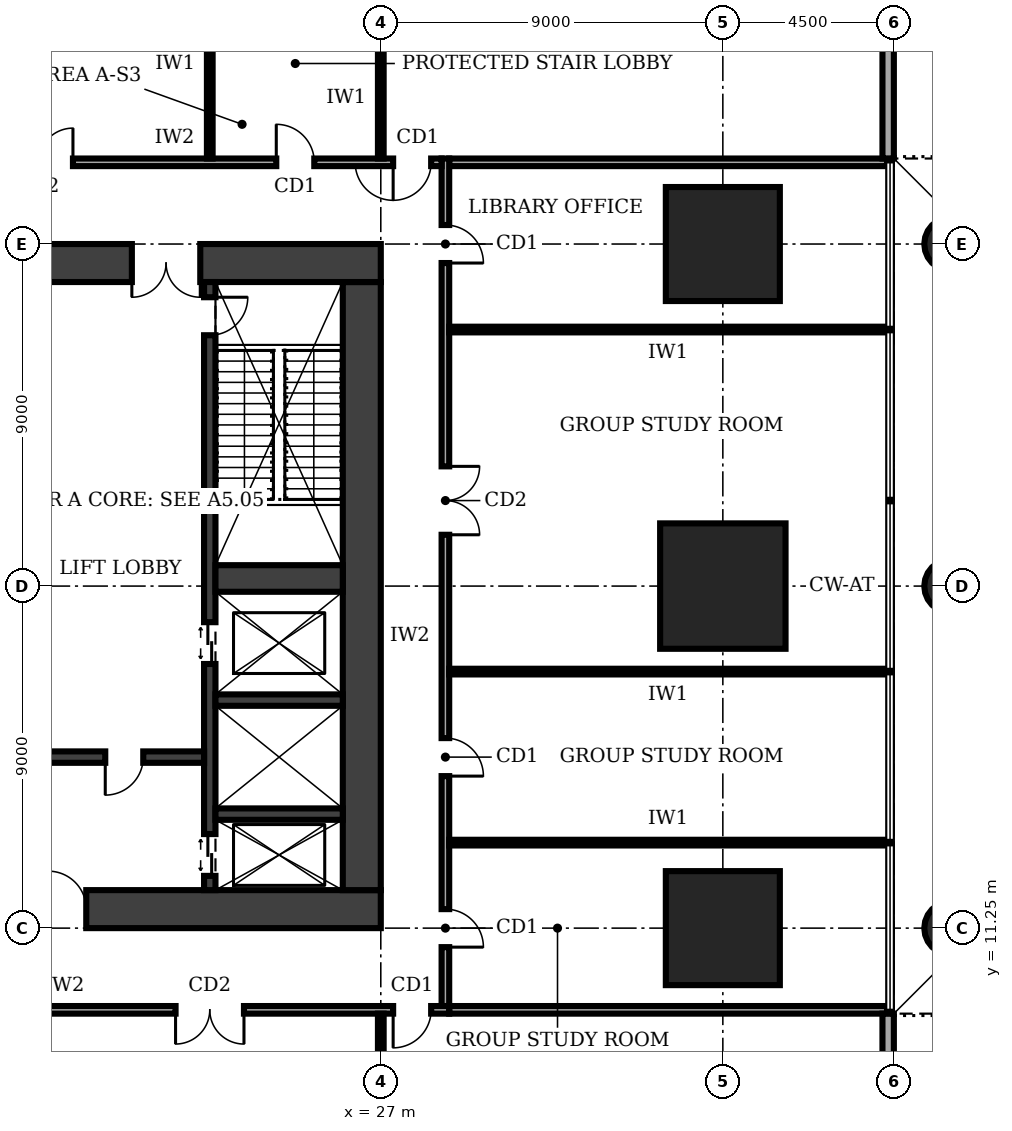
"""IFC4 building model, lengths in metres.
Left out: names, types, materials, properties, quantities, classifications, styles, units other than length and angle.
Written with IfcOpenShell. Run it as: python <this file> out.ifc"""

import sys

from ifc_helpers import new_model, si_unit, direction, frame, frame_2d, origin, origin_2d, place, context, subcontext, project, spatial, rectangle, circle, extrude, element, fill, save


model = new_model("IFC4")
c1 = context("Model", 3, precision=1e-05, world=origin(), true_north=direction((0.0, 1.0)))
c2 = subcontext(c1, "Body", "Model", "MODEL_VIEW")
j1 = project(units=[si_unit("LENGTHUNIT", "METRE"), si_unit("PLANEANGLEUNIT", "RADIAN")], contexts=[c1])
p1 = place(None, origin())
s1 = spatial("IfcSite", under=j1, at=p1, CompositionType="ELEMENT")
p2 = place(p1, origin())
s2 = spatial("IfcBuilding", under=s1, at=p2, CompositionType="ELEMENT")
p3 = place(p2, frame((0.0, 0.0, 11.0)))
s3 = spatial("IfcBuildingStorey", under=s2, at=p3, CompositionType="ELEMENT", Elevation=11.0)
p4 = place(p3, frame((13.5, 11.75, 0.0), z_axis=(0.0, 0.0, 1.0), x_axis=(1.0, 0.0, 0.0)))
e1 = element("IfcWall", 1, at=p4, inside=s3, PredefinedType="SHEAR", context=c2, shape_type="SweptSolid", body=[
    extrude(rectangle(XDim=13.5, YDim=1.0, at=frame_2d((6.75, 0.0))), origin(), (0.0, 0.0, 1.0), 5.0),
])
p5 = place(p4, frame((4.75, 0.0, 0.0)))
e2 = element("IfcOpeningElement", 2, at=p5, cuts=e1, PredefinedType="OPENING", context=c2, shape_type="SweptSolid", body=[
    extrude(rectangle(XDim=1.0, YDim=2.1, at=frame_2d((0.5, 1.05))), frame((0.0, 0.51, 0.0), z_axis=(0.0, -1.0, 0.0), x_axis=(1.0, 0.0, 0.0)), (0.0, 0.0, 1.0), 1.02),
])
p6 = place(p3, frame((26.5, 12.25, 0.0), z_axis=(0.0, 0.0, 1.0), x_axis=(0.0, 1.0, 0.0)))
e3 = element("IfcWall", 3, at=p6, inside=s3, PredefinedType="SHEAR", context=c2, shape_type="SweptSolid", body=[
    extrude(rectangle(XDim=16.0, YDim=1.0, at=frame_2d((8.0, 0.0))), origin(), (0.0, 0.0, 1.0), 5.0),
])
p7 = place(p3, frame((27.0, 28.75, 0.0), z_axis=(0.0, 0.0, 1.0), x_axis=(-1.0, 0.0, 0.0)))
e4 = element("IfcWall", 4, at=p7, inside=s3, PredefinedType="SHEAR", context=c2, shape_type="SweptSolid", body=[
    extrude(rectangle(XDim=13.5, YDim=1.0, at=frame_2d((6.75, 0.0))), origin(), (0.0, 0.0, 1.0), 5.0),
])
p8 = place(p7, frame((4.75, 0.0, 0.0)))
e5 = element("IfcOpeningElement", 5, at=p8, cuts=e4, PredefinedType="OPENING", context=c2, shape_type="SweptSolid", body=[
    extrude(rectangle(XDim=1.8, YDim=2.1, at=frame_2d((0.9, 1.05))), frame((0.0, 0.51, 0.0), z_axis=(0.0, -1.0, 0.0), x_axis=(1.0, 0.0, 0.0)), (0.0, 0.0, 1.0), 1.02),
])
p9 = place(p3, frame((22.5, 12.25, 0.0), z_axis=(0.0, 0.0, 1.0), x_axis=(0.0, 1.0, 0.0)))
e6 = element("IfcWall", 6, at=p9, inside=s3, PredefinedType="SHEAR", context=c2, shape_type="SweptSolid", body=[
    extrude(rectangle(XDim=16.0, YDim=0.3, at=frame_2d((8.0, 0.0))), origin(), (0.0, 0.0, 1.0), 5.0),
])
p10 = place(p9, frame((14.6, 0.0, 0.0)))
e7 = element("IfcOpeningElement", 7, at=p10, cuts=e6, PredefinedType="OPENING", context=c2, shape_type="SweptSolid", body=[
    extrude(rectangle(XDim=1.0, YDim=2.1, at=frame_2d((0.5, 1.05))), frame((0.0, 0.16, 0.0), z_axis=(0.0, -1.0, 0.0), x_axis=(1.0, 0.0, 0.0)), (0.0, 0.0, 1.0), 0.32),
])
p11 = place(p9, frame((0.375, 0.0, 0.0)))
e8 = element("IfcOpeningElement", 8, at=p11, cuts=e6, PredefinedType="OPENING", context=c2, shape_type="SweptSolid", body=[
    extrude(rectangle(XDim=1.1, YDim=2.1, at=frame_2d((0.55, 1.05))), frame((0.0, 0.16, 0.0), z_axis=(0.0, -1.0, 0.0), x_axis=(1.0, 0.0, 0.0)), (0.0, 0.0, 1.0), 0.32),
])
p12 = place(p9, frame((5.95, 0.0, 0.0)))
e9 = element("IfcOpeningElement", 9, at=p12, cuts=e6, PredefinedType="OPENING", context=c2, shape_type="SweptSolid", body=[
    extrude(rectangle(XDim=1.1, YDim=2.1, at=frame_2d((0.55, 1.05))), frame((0.0, 0.16, 0.0), z_axis=(0.0, -1.0, 0.0), x_axis=(1.0, 0.0, 0.0)), (0.0, 0.0, 1.0), 0.32),
])
p13 = place(p3, frame((18.15, 15.75, 0.0), z_axis=(0.0, 0.0, 1.0), x_axis=(1.0, 0.0, 0.0)))
e10 = element("IfcWall", 10, at=p13, inside=s3, PredefinedType="SHEAR", context=c2, shape_type="SweptSolid", body=[
    extrude(rectangle(XDim=4.2, YDim=0.3, at=frame_2d((2.1, 0.0))), origin(), (0.0, 0.0, 1.0), 5.0),
])
p14 = place(p13, frame((1.6, 0.0, 0.0)))
e11 = element("IfcOpeningElement", 11, at=p14, cuts=e10, PredefinedType="OPENING", context=c2, shape_type="SweptSolid", body=[
    extrude(rectangle(XDim=1.0, YDim=2.1, at=frame_2d((0.5, 1.05))), frame((0.0, 0.16, 0.0), z_axis=(0.0, -1.0, 0.0), x_axis=(1.0, 0.0, 0.0)), (0.0, 0.0, 1.0), 0.32),
])
for number, where, z_axis, x_axis in (
    (12, (22.65, 14.25, 0.0), (0.0, 0.0, 1.0), (1.0, 0.0, 0.0)),
    (13, (22.65, 17.25, 0.0), (0.0, 0.0, 1.0), (1.0, 0.0, 0.0)),
):
    element("IfcWall", number, at=place(p3, frame(where, z_axis=z_axis, x_axis=x_axis)), inside=s3, PredefinedType="SHEAR", context=c2, shape_type="SweptSolid", body=[
        extrude(rectangle(XDim=3.35, YDim=0.3, at=frame_2d((1.675, 0.0))), origin(), (0.0, 0.0, 1.0), 5.0),
    ])
p15 = place(p3, frame((22.65, 20.45, 0.0), z_axis=(0.0, 0.0, 1.0), x_axis=(1.0, 0.0, 0.0)))
e14 = element("IfcWall", 14, at=p15, inside=s3, PredefinedType="SHEAR", context=c2, shape_type="SweptSolid", body=[
    extrude(rectangle(XDim=3.35, YDim=0.7, at=frame_2d((1.675, 0.0))), origin(), (0.0, 0.0, 1.0), 5.0),
])
p16 = place(p3, frame((36.0, 11.25, 0.0), z_axis=(0.0, 0.0, 1.0), x_axis=(1.0, 0.0, 0.0)))
e15 = element("IfcColumn", 15, at=p16, inside=s3, PredefinedType="COLUMN", context=c2, shape_type="SweptSolid", body=[
    extrude(rectangle(XDim=3.0, YDim=3.0, at=origin_2d()), origin(), (0.0, 0.0, 1.0), 5.0),
])
p17 = place(p3, frame((36.0, 20.25, 0.0), z_axis=(0.0, 0.0, 1.0), x_axis=(1.0, 0.0, 0.0)))
e16 = element("IfcColumn", 16, at=p17, inside=s3, PredefinedType="COLUMN", context=c2, shape_type="SweptSolid", body=[
    extrude(rectangle(XDim=3.3, YDim=3.3, at=origin_2d()), origin(), (0.0, 0.0, 1.0), 5.0),
])
p18 = place(p3, frame((36.0, 29.25, 0.0), z_axis=(0.0, 0.0, 1.0), x_axis=(1.0, 0.0, 0.0)))
e17 = element("IfcColumn", 17, at=p18, inside=s3, PredefinedType="COLUMN", context=c2, shape_type="SweptSolid", body=[
    extrude(rectangle(XDim=3.0, YDim=3.0, at=origin_2d()), origin(), (0.0, 0.0, 1.0), 5.0),
])
for number, where, z_axis, x_axis in (
    (18, (42.0, 11.25, 0.0), (0.0, 0.0, 1.0), (1.0, 0.0, 0.0)),
    (19, (42.0, 20.25, 0.0), (0.0, 0.0, 1.0), (1.0, 0.0, 0.0)),
    (20, (42.0, 29.25, 0.0), (0.0, 0.0, 1.0), (1.0, 0.0, 0.0)),
):
    element("IfcColumn", number, at=place(p3, frame(where, z_axis=z_axis, x_axis=x_axis)), inside=s3, PredefinedType="COLUMN", context=c2, shape_type="SweptSolid", body=[
        extrude(circle(Radius=0.7, at=origin_2d()), origin(), (0.0, 0.0, 1.0), 5.0),
    ])
p19 = place(p3, frame((11.9, 9.1, 0.0), z_axis=(0.0, 0.0, 1.0), x_axis=(1.0, 0.0, 0.0)))
e21 = element("IfcWall", 21, at=p19, inside=s3, PredefinedType="SOLIDWALL", context=c2, shape_type="SweptSolid", body=[
    extrude(rectangle(XDim=16.9, YDim=0.2, at=frame_2d((8.45, 0.0))), origin(), (0.0, 0.0, 1.0), 4.7),
])
p20 = place(p19, frame((2.05, 0.0, 0.0)))
e22 = element("IfcOpeningElement", 22, at=p20, cuts=e21, PredefinedType="OPENING", context=c2, shape_type="SweptSolid", body=[
    extrude(rectangle(XDim=1.8, YDim=2.1, at=frame_2d((0.9, 1.05))), frame((0.0, 0.11, 0.0), z_axis=(0.0, -1.0, 0.0), x_axis=(1.0, 0.0, 0.0)), (0.0, 0.0, 1.0), 0.22),
])
p21 = place(p19, frame((9.7, 0.0, 0.0)))
e23 = element("IfcOpeningElement", 23, at=p21, cuts=e21, PredefinedType="OPENING", context=c2, shape_type="SweptSolid", body=[
    extrude(rectangle(XDim=1.8, YDim=2.1, at=frame_2d((0.9, 1.05))), frame((0.0, 0.11, 0.0), z_axis=(0.0, -1.0, 0.0), x_axis=(1.0, 0.0, 0.0)), (0.0, 0.0, 1.0), 0.22),
])
p22 = place(p19, frame((15.425, 0.0, 0.0)))
e24 = element("IfcOpeningElement", 24, at=p22, cuts=e21, PredefinedType="OPENING", context=c2, shape_type="SweptSolid", body=[
    extrude(rectangle(XDim=1.0, YDim=2.1, at=frame_2d((0.5, 1.05))), frame((0.0, 0.11, 0.0), z_axis=(0.0, -1.0, 0.0), x_axis=(1.0, 0.0, 0.0)), (0.0, 0.0, 1.0), 0.22),
])
p23 = place(p3, frame((28.7, 9.2, 0.0), z_axis=(0.0, 0.0, 1.0), x_axis=(0.0, 1.0, 0.0)))
e25 = element("IfcWall", 25, at=p23, inside=s3, PredefinedType="SOLIDWALL", context=c2, shape_type="SweptSolid", body=[
    extrude(rectangle(XDim=22.3, YDim=0.2, at=frame_2d((11.15, 0.0))), origin(), (0.0, 0.0, 1.0), 4.7),
])
p24 = place(p23, frame((1.55, 0.0, 0.0)))
e26 = element("IfcOpeningElement", 26, at=p24, cuts=e25, PredefinedType="OPENING", context=c2, shape_type="SweptSolid", body=[
    extrude(rectangle(XDim=1.0, YDim=2.1, at=frame_2d((0.5, 1.05))), frame((0.0, 0.11, 0.0), z_axis=(0.0, -1.0, 0.0), x_axis=(1.0, 0.0, 0.0)), (0.0, 0.0, 1.0), 0.22),
])
p25 = place(p23, frame((6.05, 0.0, 0.0)))
e27 = element("IfcOpeningElement", 27, at=p25, cuts=e25, PredefinedType="OPENING", context=c2, shape_type="SweptSolid", body=[
    extrude(rectangle(XDim=1.0, YDim=2.1, at=frame_2d((0.5, 1.05))), frame((0.0, 0.11, 0.0), z_axis=(0.0, -1.0, 0.0), x_axis=(1.0, 0.0, 0.0)), (0.0, 0.0, 1.0), 0.22),
])
p26 = place(p23, frame((12.4, 0.0, 0.0)))
e28 = element("IfcOpeningElement", 28, at=p26, cuts=e25, PredefinedType="OPENING", context=c2, shape_type="SweptSolid", body=[
    extrude(rectangle(XDim=1.8, YDim=2.1, at=frame_2d((0.9, 1.05))), frame((0.0, 0.11, 0.0), z_axis=(0.0, -1.0, 0.0), x_axis=(1.0, 0.0, 0.0)), (0.0, 0.0, 1.0), 0.22),
])
p27 = place(p23, frame((19.55, 0.0, 0.0)))
e29 = element("IfcOpeningElement", 29, at=p27, cuts=e25, PredefinedType="OPENING", context=c2, shape_type="SweptSolid", body=[
    extrude(rectangle(XDim=1.0, YDim=2.1, at=frame_2d((0.5, 1.05))), frame((0.0, 0.11, 0.0), z_axis=(0.0, -1.0, 0.0), x_axis=(1.0, 0.0, 0.0)), (0.0, 0.0, 1.0), 0.22),
])
p28 = place(p3, frame((28.6, 31.4, 0.0), z_axis=(0.0, 0.0, 1.0), x_axis=(-1.0, 0.0, 0.0)))
e30 = element("IfcWall", 30, at=p28, inside=s3, PredefinedType="SOLIDWALL", context=c2, shape_type="SweptSolid", body=[
    extrude(rectangle(XDim=16.9, YDim=0.2, at=frame_2d((8.45, 0.0))), origin(), (0.0, 0.0, 1.0), 4.7),
])
p29 = place(p28, frame((15.425, 0.0, 0.0)))
e31 = element("IfcOpeningElement", 31, at=p29, cuts=e30, PredefinedType="OPENING", context=c2, shape_type="SweptSolid", body=[
    extrude(rectangle(XDim=1.0, YDim=2.1, at=frame_2d((0.5, 1.05))), frame((0.0, 0.11, 0.0), z_axis=(0.0, -1.0, 0.0), x_axis=(1.0, 0.0, 0.0)), (0.0, 0.0, 1.0), 0.22),
])
p30 = place(p28, frame((9.7, 0.0, 0.0)))
e32 = element("IfcOpeningElement", 32, at=p30, cuts=e30, PredefinedType="OPENING", context=c2, shape_type="SweptSolid", body=[
    extrude(rectangle(XDim=1.8, YDim=2.1, at=frame_2d((0.9, 1.05))), frame((0.0, 0.11, 0.0), z_axis=(0.0, -1.0, 0.0), x_axis=(1.0, 0.0, 0.0)), (0.0, 0.0, 1.0), 0.22),
])
p31 = place(p28, frame((3.35, 0.0, 0.0)))
e33 = element("IfcOpeningElement", 33, at=p31, cuts=e30, PredefinedType="OPENING", context=c2, shape_type="SweptSolid", body=[
    extrude(rectangle(XDim=1.0, YDim=2.1, at=frame_2d((0.5, 1.05))), frame((0.0, 0.11, 0.0), z_axis=(0.0, -1.0, 0.0), x_axis=(1.0, 0.0, 0.0)), (0.0, 0.0, 1.0), 0.22),
])
p32 = place(p28, frame((0.275, 0.0, 0.0)))
e34 = element("IfcOpeningElement", 34, at=p32, cuts=e30, PredefinedType="OPENING", context=c2, shape_type="SweptSolid", body=[
    extrude(rectangle(XDim=1.0, YDim=2.1, at=frame_2d((0.5, 1.05))), frame((0.0, 0.11, 0.0), z_axis=(0.0, -1.0, 0.0), x_axis=(1.0, 0.0, 0.0)), (0.0, 0.0, 1.0), 0.22),
])
for number, where, z_axis, x_axis in (
    (35, (28.8, 9.1, 0.0), (0.0, 0.0, 1.0), (1.0, 0.0, 0.0)),
    (36, (28.8, 31.4, 0.0), (0.0, 0.0, 1.0), (1.0, 0.0, 0.0)),
):
    element("IfcWall", number, at=place(p3, frame(where, z_axis=z_axis, x_axis=x_axis)), inside=s3, PredefinedType="SOLIDWALL", context=c2, shape_type="SweptSolid", body=[
        extrude(rectangle(XDim=11.52, YDim=0.2, at=frame_2d((5.76, 0.0))), origin(), (0.0, 0.0, 1.0), 4.7),
    ])
p33 = place(p3, frame((27.0, 5.82, 0.0), z_axis=(0.0, 0.0, 1.0), x_axis=(0.0, 1.0, 0.0)))
e37 = element("IfcWall", 37, at=p33, inside=s3, PredefinedType="PARTITIONING", context=c2, shape_type="SweptSolid", body=[
    extrude(rectangle(XDim=3.18, YDim=0.15, at=frame_2d((1.59, 0.0))), origin(), (0.0, 0.0, 1.0), 3.8),
])
p34 = place(p3, frame((22.5, 31.5, 0.0), z_axis=(0.0, 0.0, 1.0), x_axis=(0.0, 1.0, 0.0)))
e38 = element("IfcWall", 38, at=p34, inside=s3, PredefinedType="PARTITIONING", context=c2, shape_type="SweptSolid", body=[
    extrude(rectangle(XDim=4.95, YDim=0.15, at=frame_2d((2.475, 0.0))), origin(), (0.0, 0.0, 1.0), 4.7),
])
p35 = place(p3, frame((27.0, 31.5, 0.0), z_axis=(0.0, 0.0, 1.0), x_axis=(0.0, 1.0, 0.0)))
e39 = element("IfcWall", 39, at=p35, inside=s3, PredefinedType="PARTITIONING", context=c2, shape_type="SweptSolid", body=[
    extrude(rectangle(XDim=3.18, YDim=0.15, at=frame_2d((1.59, 0.0))), origin(), (0.0, 0.0, 1.0), 3.8),
])
for number, where, z_axis, x_axis in (
    (40, (28.8, 13.5, 0.0), (0.0, 0.0, 1.0), (1.0, 0.0, 0.0)),
    (41, (28.8, 18.0, 0.0), (0.0, 0.0, 1.0), (1.0, 0.0, 0.0)),
    (42, (28.8, 27.0, 0.0), (0.0, 0.0, 1.0), (1.0, 0.0, 0.0)),
):
    element("IfcWall", number, at=place(p3, frame(where, z_axis=z_axis, x_axis=x_axis)), inside=s3, PredefinedType="PARTITIONING", context=c2, shape_type="SweptSolid", body=[
        extrude(rectangle(XDim=11.52, YDim=0.15, at=frame_2d((5.76, 0.0))), origin(), (0.0, 0.0, 1.0), 4.7),
    ])
p36 = place(p3, frame((40.35, 4.97, 0.0), z_axis=(0.0, 0.0, 1.0), x_axis=(0.0, 1.0, 0.0)))
e43 = element("IfcWall", 43, at=p36, inside=s3, PredefinedType="SOLIDWALL", context=c2, shape_type="SweptSolid", body=[
    extrude(rectangle(XDim=4.03, YDim=0.3, at=frame_2d((2.015, 0.0))), origin(), (0.0, 0.0, 1.0), 4.7),
])
p37 = place(p3, frame((40.35, 31.5, 0.0), z_axis=(0.0, 0.0, 1.0), x_axis=(0.0, 1.0, 0.0)))
e44 = element("IfcWall", 44, at=p37, inside=s3, PredefinedType="SOLIDWALL", context=c2, shape_type="SweptSolid", body=[
    extrude(rectangle(XDim=16.63, YDim=0.3, at=frame_2d((8.315, 0.0))), origin(), (0.0, 0.0, 1.0), 4.7),
])
p38 = place(p37, frame((12.1, 0.0, 0.0)))
e45 = element("IfcOpeningElement", 45, at=p38, cuts=e44, PredefinedType="OPENING", context=c2, shape_type="SweptSolid", body=[
    extrude(rectangle(XDim=1.8, YDim=2.1, at=frame_2d((0.9, 1.05))), frame((0.0, 0.16, 0.0), z_axis=(0.0, -1.0, 0.0), x_axis=(1.0, 0.0, 0.0)), (0.0, 0.0, 1.0), 0.32),
])
p39 = place(p5, origin())
e46 = element("IfcDoor", 46, at=p39, inside=s3, OperationType="SINGLE_SWING_LEFT", PredefinedType="DOOR", context=c2, shape_type="SweptSolid", body=[
    extrude(rectangle(XDim=1.0, YDim=2.1, at=frame_2d((0.5, 1.05))), frame((0.0, 0.025, 0.0), z_axis=(0.0, -1.0, 0.0), x_axis=(1.0, 0.0, 0.0)), (0.0, 0.0, 1.0), 0.05),
])
fill(e2, e46)
p40 = place(p8, origin())
e47 = element("IfcDoor", 47, at=p40, inside=s3, OperationType="DOUBLE_DOOR_SINGLE_SWING", PredefinedType="DOOR", context=c2, shape_type="SweptSolid", body=[
    extrude(rectangle(XDim=1.8, YDim=2.1, at=frame_2d((0.9, 1.05))), frame((0.0, 0.025, 0.0), z_axis=(0.0, -1.0, 0.0), x_axis=(1.0, 0.0, 0.0)), (0.0, 0.0, 1.0), 0.05),
])
fill(e5, e47)
p41 = place(p14, frame((1.0, 0.0, 0.0), z_axis=(0.0, 0.0, 1.0), x_axis=(-1.0, 0.0, 0.0)))
e48 = element("IfcDoor", 48, at=p41, inside=s3, OperationType="SINGLE_SWING_RIGHT", PredefinedType="DOOR", context=c2, shape_type="SweptSolid", body=[
    extrude(rectangle(XDim=1.0, YDim=2.1, at=frame_2d((0.5, 1.05))), frame((0.0, 0.025, 0.0), z_axis=(0.0, -1.0, 0.0), x_axis=(1.0, 0.0, 0.0)), (0.0, 0.0, 1.0), 0.05),
])
fill(e11, e48)
p42 = place(p10, frame((1.0, 0.0, 0.0), z_axis=(0.0, 0.0, 1.0), x_axis=(-1.0, 0.0, 0.0)))
e49 = element("IfcDoor", 49, at=p42, inside=s3, OperationType="SINGLE_SWING_LEFT", PredefinedType="DOOR", context=c2, shape_type="SweptSolid", body=[
    extrude(rectangle(XDim=1.0, YDim=2.1, at=frame_2d((0.5, 1.05))), frame((0.0, 0.025, 0.0), z_axis=(0.0, -1.0, 0.0), x_axis=(1.0, 0.0, 0.0)), (0.0, 0.0, 1.0), 0.05),
])
fill(e7, e49)
p43 = place(p11, origin())
e50 = element("IfcDoor", 50, at=p43, inside=s3, OperationType="DOUBLE_DOOR_SLIDING", PredefinedType="DOOR", context=c2, shape_type="SweptSolid", body=[
    extrude(rectangle(XDim=1.1, YDim=2.1, at=frame_2d((0.55, 1.05))), frame((0.0, 0.025, 0.0), z_axis=(0.0, -1.0, 0.0), x_axis=(1.0, 0.0, 0.0)), (0.0, 0.0, 1.0), 0.05),
])
fill(e8, e50)
p44 = place(p12, origin())
e51 = element("IfcDoor", 51, at=p44, inside=s3, OperationType="DOUBLE_DOOR_SLIDING", PredefinedType="DOOR", context=c2, shape_type="SweptSolid", body=[
    extrude(rectangle(XDim=1.1, YDim=2.1, at=frame_2d((0.55, 1.05))), frame((0.0, 0.025, 0.0), z_axis=(0.0, -1.0, 0.0), x_axis=(1.0, 0.0, 0.0)), (0.0, 0.0, 1.0), 0.05),
])
fill(e9, e51)
p45 = place(p21, frame((1.8, 0.0, 0.0), z_axis=(0.0, 0.0, 1.0), x_axis=(-1.0, 0.0, 0.0)))
e52 = element("IfcDoor", 52, at=p45, inside=s3, OperationType="DOUBLE_DOOR_SINGLE_SWING", PredefinedType="DOOR", context=c2, shape_type="SweptSolid", body=[
    extrude(rectangle(XDim=1.8, YDim=2.1, at=frame_2d((0.9, 1.05))), frame((0.0, 0.025, 0.0), z_axis=(0.0, -1.0, 0.0), x_axis=(1.0, 0.0, 0.0)), (0.0, 0.0, 1.0), 0.05),
])
fill(e23, e52)
p46 = place(p22, frame((1.0, 0.0, 0.0), z_axis=(0.0, 0.0, 1.0), x_axis=(-1.0, 0.0, 0.0)))
e53 = element("IfcDoor", 53, at=p46, inside=s3, OperationType="SINGLE_SWING_RIGHT", PredefinedType="DOOR", context=c2, shape_type="SweptSolid", body=[
    extrude(rectangle(XDim=1.0, YDim=2.1, at=frame_2d((0.5, 1.05))), frame((0.0, 0.025, 0.0), z_axis=(0.0, -1.0, 0.0), x_axis=(1.0, 0.0, 0.0)), (0.0, 0.0, 1.0), 0.05),
])
fill(e24, e53)
p47 = place(p24, frame((1.0, 0.0, 0.0), z_axis=(0.0, 0.0, 1.0), x_axis=(-1.0, 0.0, 0.0)))
e54 = element("IfcDoor", 54, at=p47, inside=s3, OperationType="SINGLE_SWING_RIGHT", PredefinedType="DOOR", context=c2, shape_type="SweptSolid", body=[
    extrude(rectangle(XDim=1.0, YDim=2.1, at=frame_2d((0.5, 1.05))), frame((0.0, 0.025, 0.0), z_axis=(0.0, -1.0, 0.0), x_axis=(1.0, 0.0, 0.0)), (0.0, 0.0, 1.0), 0.05),
])
fill(e26, e54)
p48 = place(p25, frame((1.0, 0.0, 0.0), z_axis=(0.0, 0.0, 1.0), x_axis=(-1.0, 0.0, 0.0)))
e55 = element("IfcDoor", 55, at=p48, inside=s3, OperationType="SINGLE_SWING_RIGHT", PredefinedType="DOOR", context=c2, shape_type="SweptSolid", body=[
    extrude(rectangle(XDim=1.0, YDim=2.1, at=frame_2d((0.5, 1.05))), frame((0.0, 0.025, 0.0), z_axis=(0.0, -1.0, 0.0), x_axis=(1.0, 0.0, 0.0)), (0.0, 0.0, 1.0), 0.05),
])
fill(e27, e55)
p49 = place(p26, frame((1.8, 0.0, 0.0), z_axis=(0.0, 0.0, 1.0), x_axis=(-1.0, 0.0, 0.0)))
e56 = element("IfcDoor", 56, at=p49, inside=s3, OperationType="DOUBLE_DOOR_SINGLE_SWING", PredefinedType="DOOR", context=c2, shape_type="SweptSolid", body=[
    extrude(rectangle(XDim=1.8, YDim=2.1, at=frame_2d((0.9, 1.05))), frame((0.0, 0.025, 0.0), z_axis=(0.0, -1.0, 0.0), x_axis=(1.0, 0.0, 0.0)), (0.0, 0.0, 1.0), 0.05),
])
fill(e28, e56)
p50 = place(p27, frame((1.0, 0.0, 0.0), z_axis=(0.0, 0.0, 1.0), x_axis=(-1.0, 0.0, 0.0)))
e57 = element("IfcDoor", 57, at=p50, inside=s3, OperationType="SINGLE_SWING_RIGHT", PredefinedType="DOOR", context=c2, shape_type="SweptSolid", body=[
    extrude(rectangle(XDim=1.0, YDim=2.1, at=frame_2d((0.5, 1.05))), frame((0.0, 0.025, 0.0), z_axis=(0.0, -1.0, 0.0), x_axis=(1.0, 0.0, 0.0)), (0.0, 0.0, 1.0), 0.05),
])
fill(e29, e57)
p51 = place(p30, frame((1.8, 0.0, 0.0), z_axis=(0.0, 0.0, 1.0), x_axis=(-1.0, 0.0, 0.0)))
e58 = element("IfcDoor", 58, at=p51, inside=s3, OperationType="DOUBLE_DOOR_SINGLE_SWING", PredefinedType="DOOR", context=c2, shape_type="SweptSolid", body=[
    extrude(rectangle(XDim=1.8, YDim=2.1, at=frame_2d((0.9, 1.05))), frame((0.0, 0.025, 0.0), z_axis=(0.0, -1.0, 0.0), x_axis=(1.0, 0.0, 0.0)), (0.0, 0.0, 1.0), 0.05),
])
fill(e32, e58)
p52 = place(p31, frame((1.0, 0.0, 0.0), z_axis=(0.0, 0.0, 1.0), x_axis=(-1.0, 0.0, 0.0)))
e59 = element("IfcDoor", 59, at=p52, inside=s3, OperationType="SINGLE_SWING_LEFT", PredefinedType="DOOR", context=c2, shape_type="SweptSolid", body=[
    extrude(rectangle(XDim=1.0, YDim=2.1, at=frame_2d((0.5, 1.05))), frame((0.0, 0.025, 0.0), z_axis=(0.0, -1.0, 0.0), x_axis=(1.0, 0.0, 0.0)), (0.0, 0.0, 1.0), 0.05),
])
fill(e33, e59)
p53 = place(p32, origin())
e60 = element("IfcDoor", 60, at=p53, inside=s3, OperationType="SINGLE_SWING_RIGHT", PredefinedType="DOOR", context=c2, shape_type="SweptSolid", body=[
    extrude(rectangle(XDim=1.0, YDim=2.1, at=frame_2d((0.5, 1.05))), frame((0.0, 0.025, 0.0), z_axis=(0.0, -1.0, 0.0), x_axis=(1.0, 0.0, 0.0)), (0.0, 0.0, 1.0), 0.05),
])
fill(e34, e60)
save(model, sys.argv[1])
